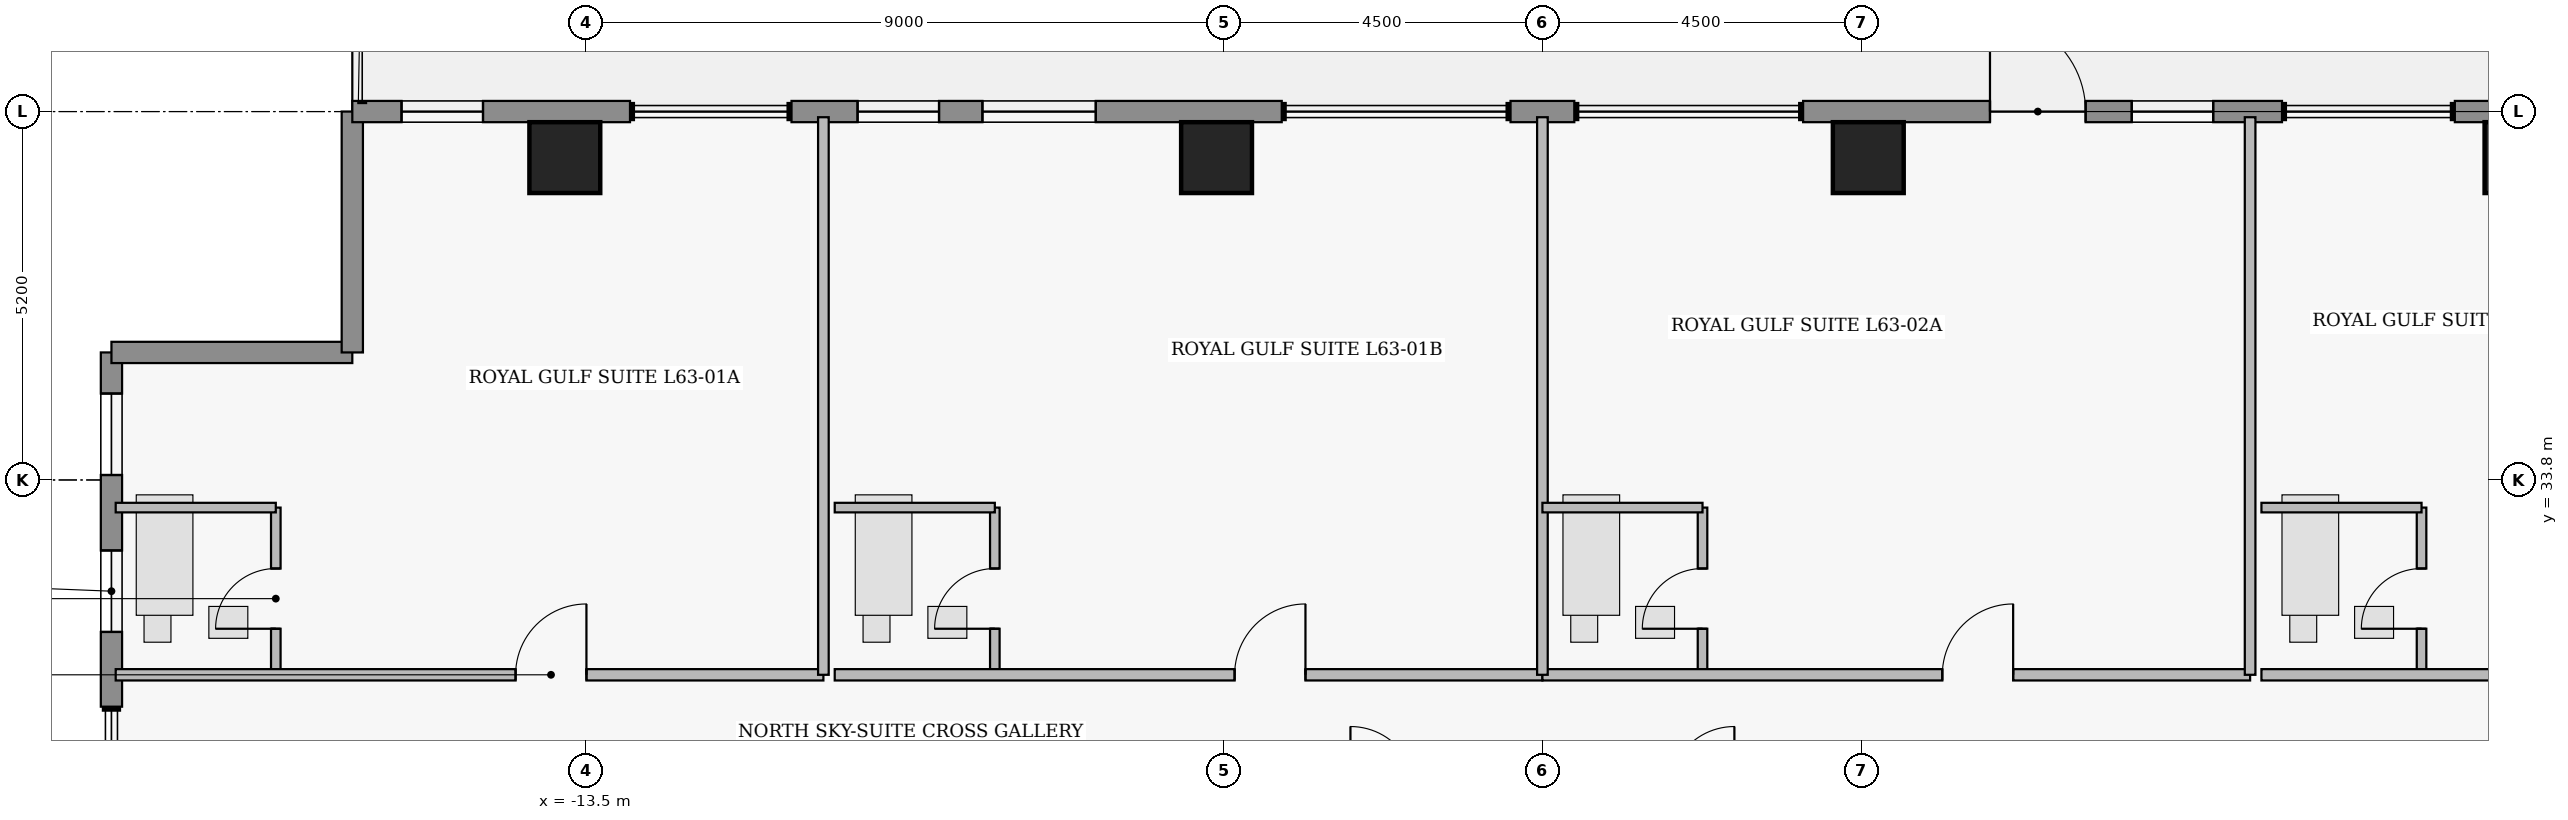
"""IFC4 building model, lengths in metres.
Left out: names, types, materials, properties, quantities, classifications, styles, units other than length and angle.
Written with IfcOpenShell. Run it as: python <this file> out.ifc"""

import sys

from ifc_helpers import new_model, si_unit, direction, frame, frame_2d, origin, origin_2d, place, context, subcontext, project, spatial, rectangle, extrude, element, fill, save


model = new_model("IFC4")
c1 = context("Model", 3, precision=1e-05, world=origin(), true_north=direction((0.0, 1.0)))
c2 = subcontext(c1, "Body", "Model", "MODEL_VIEW")
j1 = project(units=[si_unit("LENGTHUNIT", "METRE"), si_unit("PLANEANGLEUNIT", "RADIAN")], contexts=[c1])
p1 = place(None, origin())
s1 = spatial("IfcSite", under=j1, at=p1, CompositionType="ELEMENT")
p2 = place(p1, origin())
s2 = spatial("IfcBuilding", under=s1, at=p2, CompositionType="ELEMENT")
p3 = place(p2, frame((0.0, 0.0, 250.75)))
s3 = spatial("IfcBuildingStorey", under=s2, at=p3, CompositionType="ELEMENT", Elevation=250.75)
for number, where, z_axis, x_axis in (
    (1, (-13.8, 38.35, 0.0), (0.0, 0.0, 1.0), (1.0, 0.0, 0.0)),
    (2, (-4.6, 38.35, 0.0), (0.0, 0.0, 1.0), (1.0, 0.0, 0.0)),
    (3, (4.6, 38.35, 0.0), (0.0, 0.0, 1.0), (1.0, 0.0, 0.0)),
    (4, (13.8, 38.35, 0.0), (0.0, 0.0, 1.0), (1.0, 0.0, 0.0)),
):
    element("IfcColumn", number, at=place(p3, frame(where, z_axis=z_axis, x_axis=x_axis)), inside=s3, PredefinedType="COLUMN", context=c2, shape_type="SweptSolid", body=[
        extrude(rectangle(XDim=1.0, YDim=1.0, at=origin_2d()), origin(), (0.0, 0.0, 1.0), 3.7),
    ])
p4 = place(p3, frame((-20.2, 30.6, 0.0), z_axis=(0.0, 0.0, 1.0), x_axis=(0.0, 1.0, 0.0)))
e5 = element("IfcWall", 5, at=p4, inside=s3, PredefinedType="STANDARD", context=c2, shape_type="SweptSolid", body=[
    extrude(rectangle(XDim=5.0, YDim=0.3, at=frame_2d((2.5, 0.0))), origin(), (0.0, 0.0, 1.0), 3.48),
])
p5 = place(p4, frame((1.055, 0.0, 0.95)))
e6 = element("IfcOpeningElement", 6, at=p5, cuts=e5, PredefinedType="OPENING", context=c2, shape_type="SweptSolid", body=[
    extrude(rectangle(XDim=1.15, YDim=1.55, at=frame_2d((0.575, 0.775))), frame((0.0, 0.16, 0.0), z_axis=(0.0, -1.0, 0.0), x_axis=(1.0, 0.0, 0.0)), (0.0, 0.0, 1.0), 0.32),
])
p6 = place(p4, frame((3.27, 0.0, 0.95)))
e7 = element("IfcOpeningElement", 7, at=p6, cuts=e5, PredefinedType="OPENING", context=c2, shape_type="SweptSolid", body=[
    extrude(rectangle(XDim=1.15, YDim=1.55, at=frame_2d((0.575, 0.775))), frame((0.0, 0.16, 0.0), z_axis=(0.0, -1.0, 0.0), x_axis=(1.0, 0.0, 0.0)), (0.0, 0.0, 1.0), 0.32),
])
for number, where, z_axis, x_axis in (
    (8, (-20.2, 35.6, 0.0), (0.0, 0.0, 1.0), (1.0, 0.0, 0.0)),
    (9, (-16.8, 35.6, 0.0), (0.0, 0.0, 1.0), (0.0, 1.0, 0.0)),
):
    element("IfcWall", number, at=place(p3, frame(where, z_axis=z_axis, x_axis=x_axis)), inside=s3, PredefinedType="STANDARD", context=c2, shape_type="SweptSolid", body=[
        extrude(rectangle(XDim=3.4, YDim=0.3, at=frame_2d((1.7, 0.0))), origin(), (0.0, 0.0, 1.0), 3.48),
    ])
p7 = place(p3, frame((-16.8, 39.0, 0.0), z_axis=(0.0, 0.0, 1.0), x_axis=(1.0, 0.0, 0.0)))
e10 = element("IfcWall", 10, at=p7, inside=s3, PredefinedType="STANDARD", context=c2, shape_type="SweptSolid", body=[
    extrude(rectangle(XDim=3.92, YDim=0.3, at=frame_2d((1.96, 0.0))), origin(), (0.0, 0.0, 1.0), 3.48),
])
p8 = place(p7, frame((0.695, 0.0, 0.95)))
e11 = element("IfcOpeningElement", 11, at=p8, cuts=e10, PredefinedType="OPENING", context=c2, shape_type="SweptSolid", body=[
    extrude(rectangle(XDim=1.15, YDim=1.55, at=frame_2d((0.575, 0.775))), frame((0.0, 0.16, 0.0), z_axis=(0.0, -1.0, 0.0), x_axis=(1.0, 0.0, 0.0)), (0.0, 0.0, 1.0), 0.32),
])
p9 = place(p3, frame((-10.6, 39.0, 0.0), z_axis=(0.0, 0.0, 1.0), x_axis=(1.0, 0.0, 0.0)))
e12 = element("IfcWall", 12, at=p9, inside=s3, PredefinedType="STANDARD", context=c2, shape_type="SweptSolid", body=[
    extrude(rectangle(XDim=6.92, YDim=0.3, at=frame_2d((3.46, 0.0))), origin(), (0.0, 0.0, 1.0), 3.48),
])
p10 = place(p9, frame((2.695, 0.0, 0.85)))
e13 = element("IfcOpeningElement", 13, at=p10, cuts=e12, PredefinedType="OPENING", context=c2, shape_type="SweptSolid", body=[
    extrude(rectangle(XDim=1.6, YDim=1.8, at=frame_2d((0.8, 0.9))), frame((0.0, 0.16, 0.0), z_axis=(0.0, -1.0, 0.0), x_axis=(1.0, 0.0, 0.0)), (0.0, 0.0, 1.0), 0.32),
])
p11 = place(p9, frame((0.933, 0.0, 0.95)))
e14 = element("IfcOpeningElement", 14, at=p11, cuts=e12, PredefinedType="OPENING", context=c2, shape_type="SweptSolid", body=[
    extrude(rectangle(XDim=1.15, YDim=1.55, at=frame_2d((0.575, 0.775))), frame((0.0, 0.16, 0.0), z_axis=(0.0, -1.0, 0.0), x_axis=(1.0, 0.0, 0.0)), (0.0, 0.0, 1.0), 0.32),
])
p12 = place(p3, frame((-0.45, 39.0, 0.0), z_axis=(0.0, 0.0, 1.0), x_axis=(1.0, 0.0, 0.0)))
e15 = element("IfcWall", 15, at=p12, inside=s3, PredefinedType="STANDARD", context=c2, shape_type="SweptSolid", body=[
    extrude(rectangle(XDim=0.9, YDim=0.3, at=frame_2d((0.45, 0.0))), origin(), (0.0, 0.0, 1.0), 3.48),
])
p13 = place(p3, frame((3.68, 39.0, 0.0), z_axis=(0.0, 0.0, 1.0), x_axis=(1.0, 0.0, 0.0)))
e16 = element("IfcWall", 16, at=p13, inside=s3, PredefinedType="STANDARD", context=c2, shape_type="SweptSolid", body=[
    extrude(rectangle(XDim=6.76, YDim=0.3, at=frame_2d((3.38, 0.0))), origin(), (0.0, 0.0, 1.0), 3.48),
])
p14 = place(p13, frame((2.638, 0.0, 0.0)))
e17 = element("IfcOpeningElement", 17, at=p14, cuts=e16, PredefinedType="OPENING", context=c2, shape_type="SweptSolid", body=[
    extrude(rectangle(XDim=1.35, YDim=2.3, at=frame_2d((0.675, 1.15))), frame((0.0, 0.16, 0.0), z_axis=(0.0, -1.0, 0.0), x_axis=(1.0, 0.0, 0.0)), (0.0, 0.0, 1.0), 0.32),
])
p15 = place(p13, frame((4.639, 0.0, 0.95)))
e18 = element("IfcOpeningElement", 18, at=p15, cuts=e16, PredefinedType="OPENING", context=c2, shape_type="SweptSolid", body=[
    extrude(rectangle(XDim=1.15, YDim=1.55, at=frame_2d((0.575, 0.775))), frame((0.0, 0.16, 0.0), z_axis=(0.0, -1.0, 0.0), x_axis=(1.0, 0.0, 0.0)), (0.0, 0.0, 1.0), 0.32),
])
p16 = place(p3, frame((12.88, 39.0, 0.0), z_axis=(0.0, 0.0, 1.0), x_axis=(1.0, 0.0, 0.0)))
e19 = element("IfcWall", 19, at=p16, inside=s3, PredefinedType="STANDARD", context=c2, shape_type="SweptSolid", body=[
    extrude(rectangle(XDim=3.92, YDim=0.3, at=frame_2d((1.96, 0.0))), origin(), (0.0, 0.0, 1.0), 3.48),
])
p17 = place(p16, frame((2.075, 0.0, 0.95)))
e20 = element("IfcOpeningElement", 20, at=p17, cuts=e19, PredefinedType="OPENING", context=c2, shape_type="SweptSolid", body=[
    extrude(rectangle(XDim=1.15, YDim=1.55, at=frame_2d((0.575, 0.775))), frame((0.0, 0.16, 0.0), z_axis=(0.0, -1.0, 0.0), x_axis=(1.0, 0.0, 0.0)), (0.0, 0.0, 1.0), 0.32),
])
p18 = place(p3, frame((-17.88, 31.05, 0.0), z_axis=(0.0, 0.0, 1.0), x_axis=(0.0, 1.0, 0.0)))
e21 = element("IfcWall", 21, at=p18, inside=s3, PredefinedType="PLUMBINGWALL", context=c2, shape_type="SweptSolid", body=[
    extrude(rectangle(XDim=2.36, YDim=0.135, at=frame_2d((1.18, 0.0))), origin(), (0.0, 0.0, 1.0), 3.48),
])
p19 = place(p18, frame((0.65, 0.0, 0.0)))
e22 = element("IfcOpeningElement", 22, at=p19, cuts=e21, PredefinedType="OPENING", context=c2, shape_type="SweptSolid", body=[
    extrude(rectangle(XDim=0.85, YDim=2.1, at=frame_2d((0.425, 1.05))), frame((0.0, 0.077, 0.0), z_axis=(0.0, -1.0, 0.0), x_axis=(1.0, 0.0, 0.0)), (0.0, 0.0, 1.0), 0.155),
])
p20 = place(p3, frame((-20.14, 31.05, 0.0), z_axis=(0.0, 0.0, 1.0), x_axis=(1.0, 0.0, 0.0)))
e23 = element("IfcWall", 23, at=p20, inside=s3, PredefinedType="PARTITIONING", context=c2, shape_type="SweptSolid", body=[
    extrude(rectangle(XDim=9.99, YDim=0.16, at=frame_2d((4.995, 0.0))), origin(), (0.0, 0.0, 1.0), 3.48),
])
p21 = place(p20, frame((5.645, 0.0, 0.0)))
e24 = element("IfcOpeningElement", 24, at=p21, cuts=e23, PredefinedType="OPENING", context=c2, shape_type="SweptSolid", body=[
    extrude(rectangle(XDim=1.0, YDim=2.15, at=frame_2d((0.5, 1.075))), frame((0.0, 0.09, 0.0), z_axis=(0.0, -1.0, 0.0), x_axis=(1.0, 0.0, 0.0)), (0.0, 0.0, 1.0), 0.18),
])
p22 = place(p3, frame((-7.73, 31.05, 0.0), z_axis=(0.0, 0.0, 1.0), x_axis=(0.0, 1.0, 0.0)))
e25 = element("IfcWall", 25, at=p22, inside=s3, PredefinedType="PLUMBINGWALL", context=c2, shape_type="SweptSolid", body=[
    extrude(rectangle(XDim=2.36, YDim=0.135, at=frame_2d((1.18, 0.0))), origin(), (0.0, 0.0, 1.0), 3.48),
])
p23 = place(p22, frame((0.65, 0.0, 0.0)))
e26 = element("IfcOpeningElement", 26, at=p23, cuts=e25, PredefinedType="OPENING", context=c2, shape_type="SweptSolid", body=[
    extrude(rectangle(XDim=0.85, YDim=2.1, at=frame_2d((0.425, 1.05))), frame((0.0, 0.077, 0.0), z_axis=(0.0, -1.0, 0.0), x_axis=(1.0, 0.0, 0.0)), (0.0, 0.0, 1.0), 0.155),
])
p24 = place(p3, frame((-9.99, 31.05, 0.0), z_axis=(0.0, 0.0, 1.0), x_axis=(1.0, 0.0, 0.0)))
e27 = element("IfcWall", 27, at=p24, inside=s3, PredefinedType="PARTITIONING", context=c2, shape_type="SweptSolid", body=[
    extrude(rectangle(XDim=9.99, YDim=0.16, at=frame_2d((4.995, 0.0))), origin(), (0.0, 0.0, 1.0), 3.48),
])
p25 = place(p24, frame((5.645, 0.0, 0.0)))
e28 = element("IfcOpeningElement", 28, at=p25, cuts=e27, PredefinedType="OPENING", context=c2, shape_type="SweptSolid", body=[
    extrude(rectangle(XDim=1.0, YDim=2.15, at=frame_2d((0.5, 1.075))), frame((0.0, 0.09, 0.0), z_axis=(0.0, -1.0, 0.0), x_axis=(1.0, 0.0, 0.0)), (0.0, 0.0, 1.0), 0.18),
])
p26 = place(p3, frame((2.26, 31.05, 0.0), z_axis=(0.0, 0.0, 1.0), x_axis=(0.0, 1.0, 0.0)))
e29 = element("IfcWall", 29, at=p26, inside=s3, PredefinedType="PLUMBINGWALL", context=c2, shape_type="SweptSolid", body=[
    extrude(rectangle(XDim=2.36, YDim=0.135, at=frame_2d((1.18, 0.0))), origin(), (0.0, 0.0, 1.0), 3.48),
])
p27 = place(p26, frame((0.65, 0.0, 0.0)))
e30 = element("IfcOpeningElement", 30, at=p27, cuts=e29, PredefinedType="OPENING", context=c2, shape_type="SweptSolid", body=[
    extrude(rectangle(XDim=0.85, YDim=2.1, at=frame_2d((0.425, 1.05))), frame((0.0, 0.077, 0.0), z_axis=(0.0, -1.0, 0.0), x_axis=(1.0, 0.0, 0.0)), (0.0, 0.0, 1.0), 0.155),
])
p28 = place(p3, frame((0.0, 31.05, 0.0), z_axis=(0.0, 0.0, 1.0), x_axis=(1.0, 0.0, 0.0)))
e31 = element("IfcWall", 31, at=p28, inside=s3, PredefinedType="PARTITIONING", context=c2, shape_type="SweptSolid", body=[
    extrude(rectangle(XDim=9.99, YDim=0.16, at=frame_2d((4.995, 0.0))), origin(), (0.0, 0.0, 1.0), 3.48),
])
p29 = place(p28, frame((5.645, 0.0, 0.0)))
e32 = element("IfcOpeningElement", 32, at=p29, cuts=e31, PredefinedType="OPENING", context=c2, shape_type="SweptSolid", body=[
    extrude(rectangle(XDim=1.0, YDim=2.15, at=frame_2d((0.5, 1.075))), frame((0.0, 0.09, 0.0), z_axis=(0.0, -1.0, 0.0), x_axis=(1.0, 0.0, 0.0)), (0.0, 0.0, 1.0), 0.18),
])
p30 = place(p3, frame((12.41, 31.05, 0.0), z_axis=(0.0, 0.0, 1.0), x_axis=(0.0, 1.0, 0.0)))
e33 = element("IfcWall", 33, at=p30, inside=s3, PredefinedType="PLUMBINGWALL", context=c2, shape_type="SweptSolid", body=[
    extrude(rectangle(XDim=2.36, YDim=0.135, at=frame_2d((1.18, 0.0))), origin(), (0.0, 0.0, 1.0), 3.48),
])
p31 = place(p30, frame((0.65, 0.0, 0.0)))
e34 = element("IfcOpeningElement", 34, at=p31, cuts=e33, PredefinedType="OPENING", context=c2, shape_type="SweptSolid", body=[
    extrude(rectangle(XDim=0.85, YDim=2.1, at=frame_2d((0.425, 1.05))), frame((0.0, 0.077, 0.0), z_axis=(0.0, -1.0, 0.0), x_axis=(1.0, 0.0, 0.0)), (0.0, 0.0, 1.0), 0.155),
])
p32 = place(p3, frame((10.15, 31.05, 0.0), z_axis=(0.0, 0.0, 1.0), x_axis=(1.0, 0.0, 0.0)))
e35 = element("IfcWall", 35, at=p32, inside=s3, PredefinedType="PARTITIONING", context=c2, shape_type="SweptSolid", body=[
    extrude(rectangle(XDim=9.99, YDim=0.16, at=frame_2d((4.995, 0.0))), origin(), (0.0, 0.0, 1.0), 3.48),
])
p33 = place(p32, frame((5.645, 0.0, 0.0)))
e36 = element("IfcOpeningElement", 36, at=p33, cuts=e35, PredefinedType="OPENING", context=c2, shape_type="SweptSolid", body=[
    extrude(rectangle(XDim=1.0, YDim=2.15, at=frame_2d((0.5, 1.075))), frame((0.0, 0.09, 0.0), z_axis=(0.0, -1.0, 0.0), x_axis=(1.0, 0.0, 0.0)), (0.0, 0.0, 1.0), 0.18),
])
p34 = place(p3, frame((-20.14, 33.41, 0.0), z_axis=(0.0, 0.0, 1.0), x_axis=(1.0, 0.0, 0.0)))
e37 = element("IfcWall", 37, at=p34, inside=s3, PredefinedType="PLUMBINGWALL", context=c2, shape_type="SweptSolid", body=[
    extrude(rectangle(XDim=2.26, YDim=0.135, at=frame_2d((1.13, 0.0))), origin(), (0.0, 0.0, 1.0), 3.48),
])
p35 = place(p3, frame((-10.15, 31.05, 0.0), z_axis=(0.0, 0.0, 1.0), x_axis=(0.0, 1.0, 0.0)))
e38 = element("IfcWall", 38, at=p35, inside=s3, PredefinedType="PARTITIONING", context=c2, shape_type="SweptSolid", body=[
    extrude(rectangle(XDim=7.87, YDim=0.15, at=frame_2d((3.935, 0.0))), origin(), (0.0, 0.0, 1.0), 3.48),
])
p36 = place(p3, frame((-9.99, 33.41, 0.0), z_axis=(0.0, 0.0, 1.0), x_axis=(1.0, 0.0, 0.0)))
e39 = element("IfcWall", 39, at=p36, inside=s3, PredefinedType="PLUMBINGWALL", context=c2, shape_type="SweptSolid", body=[
    extrude(rectangle(XDim=2.26, YDim=0.135, at=frame_2d((1.13, 0.0))), origin(), (0.0, 0.0, 1.0), 3.076),
])
p37 = place(p3, frame((0.0, 31.05, 0.0), z_axis=(0.0, 0.0, 1.0), x_axis=(0.0, 1.0, 0.0)))
e40 = element("IfcWall", 40, at=p37, inside=s3, PredefinedType="PARTITIONING", context=c2, shape_type="SweptSolid", body=[
    extrude(rectangle(XDim=7.87, YDim=0.15, at=frame_2d((3.935, 0.0))), origin(), (0.0, 0.0, 1.0), 3.48),
])
p38 = place(p3, frame((0.0, 33.41, 0.0), z_axis=(0.0, 0.0, 1.0), x_axis=(1.0, 0.0, 0.0)))
e41 = element("IfcWall", 41, at=p38, inside=s3, PredefinedType="PLUMBINGWALL", context=c2, shape_type="SweptSolid", body=[
    extrude(rectangle(XDim=2.26, YDim=0.135, at=frame_2d((1.13, 0.0))), origin(), (0.0, 0.0, 1.0), 3.076),
])
p39 = place(p3, frame((9.99, 31.05, 0.0), z_axis=(0.0, 0.0, 1.0), x_axis=(0.0, 1.0, 0.0)))
e42 = element("IfcWall", 42, at=p39, inside=s3, PredefinedType="PARTITIONING", context=c2, shape_type="SweptSolid", body=[
    extrude(rectangle(XDim=7.87, YDim=0.15, at=frame_2d((3.935, 0.0))), origin(), (0.0, 0.0, 1.0), 3.48),
])
p40 = place(p3, frame((10.15, 33.41, 0.0), z_axis=(0.0, 0.0, 1.0), x_axis=(1.0, 0.0, 0.0)))
e43 = element("IfcWall", 43, at=p40, inside=s3, PredefinedType="PLUMBINGWALL", context=c2, shape_type="SweptSolid", body=[
    extrude(rectangle(XDim=2.26, YDim=0.135, at=frame_2d((1.13, 0.0))), origin(), (0.0, 0.0, 1.0), 3.076),
])
p41 = place(p5, origin())
e44 = element("IfcWindow", 44, at=p41, inside=s3, PartitioningType="SINGLE_PANEL", PredefinedType="WINDOW", context=c2, shape_type="SweptSolid", body=[
    extrude(rectangle(XDim=1.15, YDim=1.55, at=frame_2d((0.575, 0.775))), frame((0.0, 0.03, 0.0), z_axis=(0.0, -1.0, 0.0), x_axis=(1.0, 0.0, 0.0)), (0.0, 0.0, 1.0), 0.06),
])
fill(e6, e44)
p42 = place(p6, origin())
e45 = element("IfcWindow", 45, at=p42, inside=s3, PartitioningType="SINGLE_PANEL", PredefinedType="WINDOW", context=c2, shape_type="SweptSolid", body=[
    extrude(rectangle(XDim=1.15, YDim=1.55, at=frame_2d((0.575, 0.775))), frame((0.0, 0.03, 0.0), z_axis=(0.0, -1.0, 0.0), x_axis=(1.0, 0.0, 0.0)), (0.0, 0.0, 1.0), 0.06),
])
fill(e7, e45)
p43 = place(p8, origin())
e46 = element("IfcWindow", 46, at=p43, inside=s3, PartitioningType="SINGLE_PANEL", PredefinedType="WINDOW", context=c2, shape_type="SweptSolid", body=[
    extrude(rectangle(XDim=1.15, YDim=1.55, at=frame_2d((0.575, 0.775))), frame((0.0, 0.03, 0.0), z_axis=(0.0, -1.0, 0.0), x_axis=(1.0, 0.0, 0.0)), (0.0, 0.0, 1.0), 0.06),
])
fill(e11, e46)
p44 = place(p10, origin())
e47 = element("IfcWindow", 47, at=p44, inside=s3, PartitioningType="SINGLE_PANEL", PredefinedType="WINDOW", context=c2, shape_type="SweptSolid", body=[
    extrude(rectangle(XDim=1.6, YDim=1.8, at=frame_2d((0.8, 0.9))), frame((0.0, 0.03, 0.0), z_axis=(0.0, -1.0, 0.0), x_axis=(1.0, 0.0, 0.0)), (0.0, 0.0, 1.0), 0.06),
])
fill(e13, e47)
p45 = place(p11, origin())
e48 = element("IfcWindow", 48, at=p45, inside=s3, PartitioningType="SINGLE_PANEL", PredefinedType="WINDOW", context=c2, shape_type="SweptSolid", body=[
    extrude(rectangle(XDim=1.15, YDim=1.55, at=frame_2d((0.575, 0.775))), frame((0.0, 0.03, 0.0), z_axis=(0.0, -1.0, 0.0), x_axis=(1.0, 0.0, 0.0)), (0.0, 0.0, 1.0), 0.06),
])
fill(e14, e48)
p46 = place(p14, origin())
e49 = element("IfcDoor", 49, at=p46, inside=s3, OperationType="SINGLE_SWING_LEFT", PredefinedType="DOOR", context=c2, shape_type="SweptSolid", body=[
    extrude(rectangle(XDim=1.35, YDim=2.3, at=frame_2d((0.675, 1.15))), frame((0.0, 0.025, 0.0), z_axis=(0.0, -1.0, 0.0), x_axis=(1.0, 0.0, 0.0)), (0.0, 0.0, 1.0), 0.05),
])
fill(e17, e49)
p47 = place(p15, origin())
e50 = element("IfcWindow", 50, at=p47, inside=s3, PartitioningType="SINGLE_PANEL", PredefinedType="WINDOW", context=c2, shape_type="SweptSolid", body=[
    extrude(rectangle(XDim=1.15, YDim=1.55, at=frame_2d((0.575, 0.775))), frame((0.0, 0.03, 0.0), z_axis=(0.0, -1.0, 0.0), x_axis=(1.0, 0.0, 0.0)), (0.0, 0.0, 1.0), 0.06),
])
fill(e18, e50)
p48 = place(p19, origin())
e51 = element("IfcDoor", 51, at=p48, inside=s3, OperationType="SINGLE_SWING_LEFT", PredefinedType="DOOR", context=c2, shape_type="SweptSolid", body=[
    extrude(rectangle(XDim=0.85, YDim=2.1, at=frame_2d((0.425, 1.05))), frame((0.0, 0.025, 0.0), z_axis=(0.0, -1.0, 0.0), x_axis=(1.0, 0.0, 0.0)), (0.0, 0.0, 1.0), 0.05),
])
fill(e22, e51)
p49 = place(p21, origin())
e52 = element("IfcDoor", 52, at=p49, inside=s3, OperationType="SINGLE_SWING_RIGHT", PredefinedType="DOOR", context=c2, shape_type="SweptSolid", body=[
    extrude(rectangle(XDim=1.0, YDim=2.15, at=frame_2d((0.5, 1.075))), frame((0.0, 0.025, 0.0), z_axis=(0.0, -1.0, 0.0), x_axis=(1.0, 0.0, 0.0)), (0.0, 0.0, 1.0), 0.05),
])
fill(e24, e52)
p50 = place(p23, origin())
e53 = element("IfcDoor", 53, at=p50, inside=s3, OperationType="SINGLE_SWING_LEFT", PredefinedType="DOOR", context=c2, shape_type="SweptSolid", body=[
    extrude(rectangle(XDim=0.85, YDim=2.1, at=frame_2d((0.425, 1.05))), frame((0.0, 0.025, 0.0), z_axis=(0.0, -1.0, 0.0), x_axis=(1.0, 0.0, 0.0)), (0.0, 0.0, 1.0), 0.05),
])
fill(e26, e53)
p51 = place(p25, origin())
e54 = element("IfcDoor", 54, at=p51, inside=s3, OperationType="SINGLE_SWING_RIGHT", PredefinedType="DOOR", context=c2, shape_type="SweptSolid", body=[
    extrude(rectangle(XDim=1.0, YDim=2.15, at=frame_2d((0.5, 1.075))), frame((0.0, 0.025, 0.0), z_axis=(0.0, -1.0, 0.0), x_axis=(1.0, 0.0, 0.0)), (0.0, 0.0, 1.0), 0.05),
])
fill(e28, e54)
p52 = place(p27, origin())
e55 = element("IfcDoor", 55, at=p52, inside=s3, OperationType="SINGLE_SWING_LEFT", PredefinedType="DOOR", context=c2, shape_type="SweptSolid", body=[
    extrude(rectangle(XDim=0.85, YDim=2.1, at=frame_2d((0.425, 1.05))), frame((0.0, 0.025, 0.0), z_axis=(0.0, -1.0, 0.0), x_axis=(1.0, 0.0, 0.0)), (0.0, 0.0, 1.0), 0.05),
])
fill(e30, e55)
p53 = place(p29, origin())
e56 = element("IfcDoor", 56, at=p53, inside=s3, OperationType="SINGLE_SWING_RIGHT", PredefinedType="DOOR", context=c2, shape_type="SweptSolid", body=[
    extrude(rectangle(XDim=1.0, YDim=2.15, at=frame_2d((0.5, 1.075))), frame((0.0, 0.025, 0.0), z_axis=(0.0, -1.0, 0.0), x_axis=(1.0, 0.0, 0.0)), (0.0, 0.0, 1.0), 0.05),
])
fill(e32, e56)
p54 = place(p31, origin())
e57 = element("IfcDoor", 57, at=p54, inside=s3, OperationType="SINGLE_SWING_LEFT", PredefinedType="DOOR", context=c2, shape_type="SweptSolid", body=[
    extrude(rectangle(XDim=0.85, YDim=2.1, at=frame_2d((0.425, 1.05))), frame((0.0, 0.025, 0.0), z_axis=(0.0, -1.0, 0.0), x_axis=(1.0, 0.0, 0.0)), (0.0, 0.0, 1.0), 0.05),
])
fill(e34, e57)
save(model, sys.argv[1])
